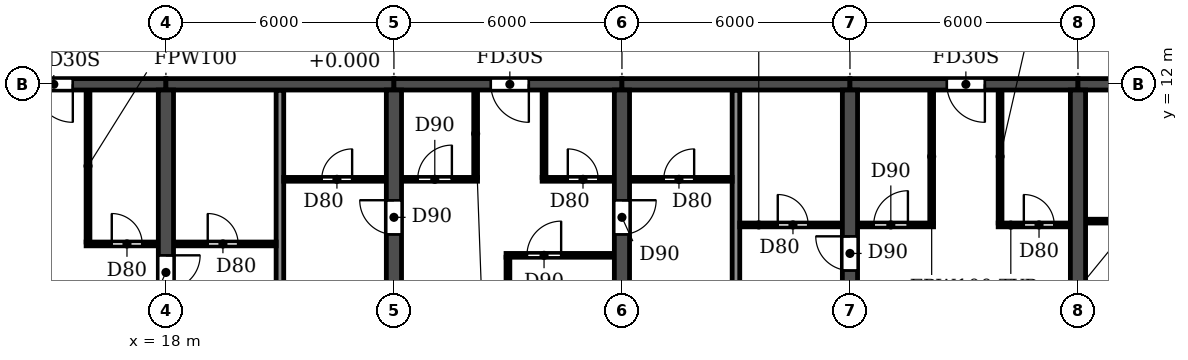
"""IFC4 building model, lengths in metres.
Left out: names, types, materials, properties, quantities, classifications, styles, units other than length and angle.
Written with IfcOpenShell. Run it as: python <this file> out.ifc"""

import sys

from ifc_helpers import new_model, si_unit, direction, frame, frame_2d, origin, place, context, subcontext, project, spatial, rectangle, extrude, element, fill, save


model = new_model("IFC4")
c1 = context("Model", 3, precision=1e-05, world=origin(), true_north=direction((0.0, 1.0)))
c2 = subcontext(c1, "Body", "Model", "MODEL_VIEW")
j1 = project(units=[si_unit("LENGTHUNIT", "METRE"), si_unit("PLANEANGLEUNIT", "RADIAN")], contexts=[c1])
p1 = place(None, origin())
s1 = spatial("IfcSite", under=j1, at=p1, CompositionType="ELEMENT")
p2 = place(p1, origin())
s2 = spatial("IfcBuilding", under=s1, at=p2, CompositionType="ELEMENT")
p3 = place(p2, frame((0.0, 0.0, 43.2)))
s3 = spatial("IfcBuildingStorey", under=s2, at=p3, CompositionType="ELEMENT", Elevation=43.2)
p4 = place(p3, frame((18.0, 0.2, 0.0), z_axis=(0.0, 0.0, 1.0), x_axis=(0.0, 1.0, 0.0)))
e1 = element("IfcWall", 1, at=p4, inside=s3, PredefinedType="SHEAR", context=c2, shape_type="SweptSolid", body=[
    extrude(rectangle(XDim=11.65, YDim=0.4, at=frame_2d((5.825, 0.0))), origin(), (0.0, 0.0, 1.0), 3.05),
])
p5 = place(p4, frame((6.4, 0.0, 0.0)))
e2 = element("IfcOpeningElement", 2, at=p5, cuts=e1, PredefinedType="OPENING", context=c2, shape_type="SweptSolid", body=[
    extrude(rectangle(XDim=0.9, YDim=2.1, at=frame_2d((0.45, 1.05))), frame((0.0, 0.21, 0.0), z_axis=(0.0, -1.0, 0.0), x_axis=(1.0, 0.0, 0.0)), (0.0, 0.0, 1.0), 0.42),
])
p6 = place(p3, frame((24.0, 0.2, 0.0), z_axis=(0.0, 0.0, 1.0), x_axis=(0.0, 1.0, 0.0)))
e3 = element("IfcWall", 3, at=p6, inside=s3, PredefinedType="SHEAR", context=c2, shape_type="SweptSolid", body=[
    extrude(rectangle(XDim=11.65, YDim=0.4, at=frame_2d((5.825, 0.0))), origin(), (0.0, 0.0, 1.0), 3.05),
])
p7 = place(p6, frame((7.85, 0.0, 0.0)))
e4 = element("IfcOpeningElement", 4, at=p7, cuts=e3, PredefinedType="OPENING", context=c2, shape_type="SweptSolid", body=[
    extrude(rectangle(XDim=0.9, YDim=2.1, at=frame_2d((0.45, 1.05))), frame((0.0, 0.21, 0.0), z_axis=(0.0, -1.0, 0.0), x_axis=(1.0, 0.0, 0.0)), (0.0, 0.0, 1.0), 0.42),
])
p8 = place(p3, frame((30.0, 0.2, 0.0), z_axis=(0.0, 0.0, 1.0), x_axis=(0.0, 1.0, 0.0)))
e5 = element("IfcWall", 5, at=p8, inside=s3, PredefinedType="SHEAR", context=c2, shape_type="SweptSolid", body=[
    extrude(rectangle(XDim=11.65, YDim=0.4, at=frame_2d((5.825, 0.0))), origin(), (0.0, 0.0, 1.0), 3.05),
])
p9 = place(p8, frame((7.85, 0.0, 0.0)))
e6 = element("IfcOpeningElement", 6, at=p9, cuts=e5, PredefinedType="OPENING", context=c2, shape_type="SweptSolid", body=[
    extrude(rectangle(XDim=0.9, YDim=2.1, at=frame_2d((0.45, 1.05))), frame((0.0, 0.21, 0.0), z_axis=(0.0, -1.0, 0.0), x_axis=(1.0, 0.0, 0.0)), (0.0, 0.0, 1.0), 0.42),
])
p10 = place(p3, frame((36.0, 0.2, 0.0), z_axis=(0.0, 0.0, 1.0), x_axis=(0.0, 1.0, 0.0)))
e7 = element("IfcWall", 7, at=p10, inside=s3, PredefinedType="SHEAR", context=c2, shape_type="SweptSolid", body=[
    extrude(rectangle(XDim=11.65, YDim=0.4, at=frame_2d((5.825, 0.0))), origin(), (0.0, 0.0, 1.0), 3.05),
])
p11 = place(p10, frame((6.9, 0.0, 0.0)))
e8 = element("IfcOpeningElement", 8, at=p11, cuts=e7, PredefinedType="OPENING", context=c2, shape_type="SweptSolid", body=[
    extrude(rectangle(XDim=0.9, YDim=2.1, at=frame_2d((0.45, 1.05))), frame((0.0, 0.21, 0.0), z_axis=(0.0, -1.0, 0.0), x_axis=(1.0, 0.0, 0.0)), (0.0, 0.0, 1.0), 0.42),
])
p12 = place(p3, frame((42.0, 0.2, 0.0), z_axis=(0.0, 0.0, 1.0), x_axis=(0.0, 1.0, 0.0)))
e9 = element("IfcWall", 9, at=p12, inside=s3, PredefinedType="SHEAR", context=c2, shape_type="SweptSolid", body=[
    extrude(rectangle(XDim=11.65, YDim=0.4, at=frame_2d((5.825, 0.0))), origin(), (0.0, 0.0, 1.0), 3.05),
])
p13 = place(p3, frame((12.0, 12.0, 0.0), z_axis=(0.0, 0.0, 1.0), x_axis=(1.0, 0.0, 0.0)))
e10 = element("IfcWall", 10, at=p13, inside=s3, PredefinedType="SHEAR", context=c2, shape_type="SweptSolid", body=[
    extrude(rectangle(XDim=6.0, YDim=0.3, at=frame_2d((3.0, 0.0))), origin(), (0.0, 0.0, 1.0), 2.45),
])
p14 = place(p13, frame((2.55, 0.0, 0.0)))
e11 = element("IfcOpeningElement", 11, at=p14, cuts=e10, PredefinedType="OPENING", context=c2, shape_type="SweptSolid", body=[
    extrude(rectangle(XDim=1.0, YDim=2.1, at=frame_2d((0.5, 1.05))), frame((0.0, 0.16, 0.0), z_axis=(0.0, -1.0, 0.0), x_axis=(1.0, 0.0, 0.0)), (0.0, 0.0, 1.0), 0.32),
])
p15 = place(p3, frame((18.0, 12.0, 0.0), z_axis=(0.0, 0.0, 1.0), x_axis=(1.0, 0.0, 0.0)))
e12 = element("IfcWall", 12, at=p15, inside=s3, PredefinedType="SHEAR", context=c2, shape_type="SweptSolid", body=[
    extrude(rectangle(XDim=6.0, YDim=0.3, at=frame_2d((3.0, 0.0))), origin(), (0.0, 0.0, 1.0), 2.45),
])
p16 = place(p3, frame((24.0, 12.0, 0.0), z_axis=(0.0, 0.0, 1.0), x_axis=(1.0, 0.0, 0.0)))
e13 = element("IfcWall", 13, at=p16, inside=s3, PredefinedType="SHEAR", context=c2, shape_type="SweptSolid", body=[
    extrude(rectangle(XDim=6.0, YDim=0.3, at=frame_2d((3.0, 0.0))), origin(), (0.0, 0.0, 1.0), 2.45),
])
p17 = place(p16, frame((2.55, 0.0, 0.0)))
e14 = element("IfcOpeningElement", 14, at=p17, cuts=e13, PredefinedType="OPENING", context=c2, shape_type="SweptSolid", body=[
    extrude(rectangle(XDim=1.0, YDim=2.1, at=frame_2d((0.5, 1.05))), frame((0.0, 0.16, 0.0), z_axis=(0.0, -1.0, 0.0), x_axis=(1.0, 0.0, 0.0)), (0.0, 0.0, 1.0), 0.32),
])
p18 = place(p3, frame((30.0, 12.0, 0.0), z_axis=(0.0, 0.0, 1.0), x_axis=(1.0, 0.0, 0.0)))
e15 = element("IfcWall", 15, at=p18, inside=s3, PredefinedType="SHEAR", context=c2, shape_type="SweptSolid", body=[
    extrude(rectangle(XDim=6.0, YDim=0.3, at=frame_2d((3.0, 0.0))), origin(), (0.0, 0.0, 1.0), 2.45),
])
p19 = place(p3, frame((36.0, 12.0, 0.0), z_axis=(0.0, 0.0, 1.0), x_axis=(1.0, 0.0, 0.0)))
e16 = element("IfcWall", 16, at=p19, inside=s3, PredefinedType="SHEAR", context=c2, shape_type="SweptSolid", body=[
    extrude(rectangle(XDim=6.0, YDim=0.3, at=frame_2d((3.0, 0.0))), origin(), (0.0, 0.0, 1.0), 2.45),
])
p20 = place(p19, frame((2.55, 0.0, 0.0)))
e17 = element("IfcOpeningElement", 17, at=p20, cuts=e16, PredefinedType="OPENING", context=c2, shape_type="SweptSolid", body=[
    extrude(rectangle(XDim=1.0, YDim=2.1, at=frame_2d((0.5, 1.05))), frame((0.0, 0.16, 0.0), z_axis=(0.0, -1.0, 0.0), x_axis=(1.0, 0.0, 0.0)), (0.0, 0.0, 1.0), 0.32),
])
p21 = place(p3, frame((42.0, 12.0, 0.0), z_axis=(0.0, 0.0, 1.0), x_axis=(1.0, 0.0, 0.0)))
e18 = element("IfcWall", 18, at=p21, inside=s3, PredefinedType="SHEAR", context=c2, shape_type="SweptSolid", body=[
    extrude(rectangle(XDim=6.0, YDim=0.3, at=frame_2d((3.0, 0.0))), origin(), (0.0, 0.0, 1.0), 2.45),
])
p22 = place(p21, frame((2.45, 0.0, 0.0)))
e19 = element("IfcOpeningElement", 19, at=p22, cuts=e18, PredefinedType="OPENING", context=c2, shape_type="SweptSolid", body=[
    extrude(rectangle(XDim=1.0, YDim=2.1, at=frame_2d((0.5, 1.05))), frame((0.0, 0.16, 0.0), z_axis=(0.0, -1.0, 0.0), x_axis=(1.0, 0.0, 0.0)), (0.0, 0.0, 1.0), 0.32),
])
for number, where, z_axis, x_axis in (
    (20, (21.0, 0.06, 0.0), (0.0, 0.0, 1.0), (0.0, 1.0, 0.0)),
    (21, (33.0, 0.06, 0.0), (0.0, 0.0, 1.0), (0.0, 1.0, 0.0)),
):
    element("IfcWall", number, at=place(p3, frame(where, z_axis=z_axis, x_axis=x_axis)), inside=s3, PredefinedType="PARTITIONING", context=c2, shape_type="SweptSolid", body=[
        extrude(rectangle(XDim=11.78, YDim=0.2, at=frame_2d((5.89, 0.0))), origin(), (0.0, 0.0, 1.0), 3.05),
    ])
p23 = place(p3, frame((26.95, 7.5, 0.0), z_axis=(0.0, 0.0, 1.0), x_axis=(1.0, 0.0, 0.0)))
e22 = element("IfcWall", 22, at=p23, inside=s3, PredefinedType="PARTITIONING", context=c2, shape_type="SweptSolid", body=[
    extrude(rectangle(XDim=2.84, YDim=0.1, at=frame_2d((1.42, 0.0))), origin(), (0.0, 0.0, 1.0), 3.05),
])
p24 = place(p23, frame((0.55, 0.0, 0.0)))
e23 = element("IfcOpeningElement", 23, at=p24, cuts=e22, PredefinedType="OPENING", context=c2, shape_type="SweptSolid", body=[
    extrude(rectangle(XDim=0.9, YDim=2.1, at=frame_2d((0.45, 1.05))), frame((0.0, 0.06, 0.0), z_axis=(0.0, -1.0, 0.0), x_axis=(1.0, 0.0, 0.0)), (0.0, 0.0, 1.0), 0.12),
])
p25 = place(p3, frame((15.9, 7.8, 0.0), z_axis=(0.0, 0.0, 1.0), x_axis=(1.0, 0.0, 0.0)))
e24 = element("IfcWall", 24, at=p25, inside=s3, PredefinedType="PARTITIONING", context=c2, shape_type="SweptSolid", body=[
    extrude(rectangle(XDim=1.89, YDim=0.1, at=frame_2d((0.945, 0.0))), origin(), (0.0, 0.0, 1.0), 3.05),
])
p26 = place(p25, frame((0.675, 0.0, 0.0)))
e25 = element("IfcOpeningElement", 25, at=p26, cuts=e24, PredefinedType="OPENING", context=c2, shape_type="SweptSolid", body=[
    extrude(rectangle(XDim=0.8, YDim=2.1, at=frame_2d((0.4, 1.05))), frame((0.0, 0.06, 0.0), z_axis=(0.0, -1.0, 0.0), x_axis=(1.0, 0.0, 0.0)), (0.0, 0.0, 1.0), 0.12),
])
p27 = place(p3, frame((18.21, 7.8, 0.0), z_axis=(0.0, 0.0, 1.0), x_axis=(1.0, 0.0, 0.0)))
e26 = element("IfcWall", 26, at=p27, inside=s3, PredefinedType="PARTITIONING", context=c2, shape_type="SweptSolid", body=[
    extrude(rectangle(XDim=2.69, YDim=0.1, at=frame_2d((1.345, 0.0))), origin(), (0.0, 0.0, 1.0), 3.05),
])
p28 = place(p27, frame((0.89, 0.0, 0.0)))
e27 = element("IfcOpeningElement", 27, at=p28, cuts=e26, PredefinedType="OPENING", context=c2, shape_type="SweptSolid", body=[
    extrude(rectangle(XDim=0.8, YDim=2.1, at=frame_2d((0.4, 1.05))), frame((0.0, 0.06, 0.0), z_axis=(0.0, -1.0, 0.0), x_axis=(1.0, 0.0, 0.0)), (0.0, 0.0, 1.0), 0.12),
])
p29 = place(p3, frame((33.1, 8.3, 0.0), z_axis=(0.0, 0.0, 1.0), x_axis=(1.0, 0.0, 0.0)))
e28 = element("IfcWall", 28, at=p29, inside=s3, PredefinedType="PARTITIONING", context=c2, shape_type="SweptSolid", body=[
    extrude(rectangle(XDim=2.69, YDim=0.1, at=frame_2d((1.345, 0.0))), origin(), (0.0, 0.0, 1.0), 3.05),
])
p30 = place(p29, frame((1.0, 0.0, 0.0)))
e29 = element("IfcOpeningElement", 29, at=p30, cuts=e28, PredefinedType="OPENING", context=c2, shape_type="SweptSolid", body=[
    extrude(rectangle(XDim=0.8, YDim=2.1, at=frame_2d((0.4, 1.05))), frame((0.0, 0.06, 0.0), z_axis=(0.0, -1.0, 0.0), x_axis=(1.0, 0.0, 0.0)), (0.0, 0.0, 1.0), 0.12),
])
p31 = place(p3, frame((36.21, 8.3, 0.0), z_axis=(0.0, 0.0, 1.0), x_axis=(1.0, 0.0, 0.0)))
e30 = element("IfcWall", 30, at=p31, inside=s3, PredefinedType="PARTITIONING", context=c2, shape_type="SweptSolid", body=[
    extrude(rectangle(XDim=1.99, YDim=0.1, at=frame_2d((0.995, 0.0))), origin(), (0.0, 0.0, 1.0), 3.05),
])
p32 = place(p31, frame((0.415, 0.0, 0.0)))
e31 = element("IfcOpeningElement", 31, at=p32, cuts=e30, PredefinedType="OPENING", context=c2, shape_type="SweptSolid", body=[
    extrude(rectangle(XDim=0.9, YDim=2.1, at=frame_2d((0.45, 1.05))), frame((0.0, 0.06, 0.0), z_axis=(0.0, -1.0, 0.0), x_axis=(1.0, 0.0, 0.0)), (0.0, 0.0, 1.0), 0.12),
])
p33 = place(p3, frame((39.9, 8.3, 0.0), z_axis=(0.0, 0.0, 1.0), x_axis=(1.0, 0.0, 0.0)))
e32 = element("IfcWall", 32, at=p33, inside=s3, PredefinedType="PARTITIONING", context=c2, shape_type="SweptSolid", body=[
    extrude(rectangle(XDim=1.89, YDim=0.1, at=frame_2d((0.945, 0.0))), origin(), (0.0, 0.0, 1.0), 3.05),
])
p34 = place(p33, frame((0.675, 0.0, 0.0)))
e33 = element("IfcOpeningElement", 33, at=p34, cuts=e32, PredefinedType="OPENING", context=c2, shape_type="SweptSolid", body=[
    extrude(rectangle(XDim=0.8, YDim=2.1, at=frame_2d((0.4, 1.05))), frame((0.0, 0.06, 0.0), z_axis=(0.0, -1.0, 0.0), x_axis=(1.0, 0.0, 0.0)), (0.0, 0.0, 1.0), 0.12),
])
p35 = place(p3, frame((42.21, 8.4, 0.0), z_axis=(0.0, 0.0, 1.0), x_axis=(1.0, 0.0, 0.0)))
e34 = element("IfcWall", 34, at=p35, inside=s3, PredefinedType="PARTITIONING", context=c2, shape_type="SweptSolid", body=[
    extrude(rectangle(XDim=1.89, YDim=0.1, at=frame_2d((0.945, 0.0))), origin(), (0.0, 0.0, 1.0), 3.05),
])
p36 = place(p3, frame((21.1, 9.5, 0.0), z_axis=(0.0, 0.0, 1.0), x_axis=(1.0, 0.0, 0.0)))
e35 = element("IfcWall", 35, at=p36, inside=s3, PredefinedType="PARTITIONING", context=c2, shape_type="SweptSolid", body=[
    extrude(rectangle(XDim=2.69, YDim=0.1, at=frame_2d((1.345, 0.0))), origin(), (0.0, 0.0, 1.0), 3.05),
])
p37 = place(p36, frame((1.0, 0.0, 0.0)))
e36 = element("IfcOpeningElement", 36, at=p37, cuts=e35, PredefinedType="OPENING", context=c2, shape_type="SweptSolid", body=[
    extrude(rectangle(XDim=0.8, YDim=2.1, at=frame_2d((0.4, 1.05))), frame((0.0, 0.06, 0.0), z_axis=(0.0, -1.0, 0.0), x_axis=(1.0, 0.0, 0.0)), (0.0, 0.0, 1.0), 0.12),
])
p38 = place(p3, frame((24.21, 9.5, 0.0), z_axis=(0.0, 0.0, 1.0), x_axis=(1.0, 0.0, 0.0)))
e37 = element("IfcWall", 37, at=p38, inside=s3, PredefinedType="PARTITIONING", context=c2, shape_type="SweptSolid", body=[
    extrude(rectangle(XDim=1.99, YDim=0.1, at=frame_2d((0.995, 0.0))), origin(), (0.0, 0.0, 1.0), 3.05),
])
p39 = place(p38, frame((0.415, 0.0, 0.0)))
e38 = element("IfcOpeningElement", 38, at=p39, cuts=e37, PredefinedType="OPENING", context=c2, shape_type="SweptSolid", body=[
    extrude(rectangle(XDim=0.9, YDim=2.1, at=frame_2d((0.45, 1.05))), frame((0.0, 0.06, 0.0), z_axis=(0.0, -1.0, 0.0), x_axis=(1.0, 0.0, 0.0)), (0.0, 0.0, 1.0), 0.12),
])
p40 = place(p3, frame((27.9, 9.5, 0.0), z_axis=(0.0, 0.0, 1.0), x_axis=(1.0, 0.0, 0.0)))
e39 = element("IfcWall", 39, at=p40, inside=s3, PredefinedType="PARTITIONING", context=c2, shape_type="SweptSolid", body=[
    extrude(rectangle(XDim=1.89, YDim=0.1, at=frame_2d((0.945, 0.0))), origin(), (0.0, 0.0, 1.0), 3.05),
])
p41 = place(p40, frame((0.675, 0.0, 0.0)))
e40 = element("IfcOpeningElement", 40, at=p41, cuts=e39, PredefinedType="OPENING", context=c2, shape_type="SweptSolid", body=[
    extrude(rectangle(XDim=0.8, YDim=2.1, at=frame_2d((0.4, 1.05))), frame((0.0, 0.06, 0.0), z_axis=(0.0, -1.0, 0.0), x_axis=(1.0, 0.0, 0.0)), (0.0, 0.0, 1.0), 0.12),
])
p42 = place(p3, frame((30.21, 9.5, 0.0), z_axis=(0.0, 0.0, 1.0), x_axis=(1.0, 0.0, 0.0)))
e41 = element("IfcWall", 41, at=p42, inside=s3, PredefinedType="PARTITIONING", context=c2, shape_type="SweptSolid", body=[
    extrude(rectangle(XDim=2.69, YDim=0.1, at=frame_2d((1.345, 0.0))), origin(), (0.0, 0.0, 1.0), 3.05),
])
p43 = place(p42, frame((0.89, 0.0, 0.0)))
e42 = element("IfcOpeningElement", 42, at=p43, cuts=e41, PredefinedType="OPENING", context=c2, shape_type="SweptSolid", body=[
    extrude(rectangle(XDim=0.8, YDim=2.1, at=frame_2d((0.4, 1.05))), frame((0.0, 0.06, 0.0), z_axis=(0.0, -1.0, 0.0), x_axis=(1.0, 0.0, 0.0)), (0.0, 0.0, 1.0), 0.12),
])
p44 = place(p3, frame((15.95, 7.85, 0.0), z_axis=(0.0, 0.0, 1.0), x_axis=(0.0, 1.0, 0.0)))
e43 = element("IfcWall", 43, at=p44, inside=s3, PredefinedType="PARTITIONING", context=c2, shape_type="SweptSolid", body=[
    extrude(rectangle(XDim=3.99, YDim=0.1, at=frame_2d((1.995, 0.0))), origin(), (0.0, 0.0, 1.0), 3.05),
])
p45 = place(p3, frame((26.15, 9.55, 0.0), z_axis=(0.0, 0.0, 1.0), x_axis=(0.0, 1.0, 0.0)))
e44 = element("IfcWall", 44, at=p45, inside=s3, PredefinedType="PARTITIONING", context=c2, shape_type="SweptSolid", body=[
    extrude(rectangle(XDim=2.29, YDim=0.1, at=frame_2d((1.145, 0.0))), origin(), (0.0, 0.0, 1.0), 3.05),
])
p46 = place(p3, frame((27.0, 0.06, 0.0), z_axis=(0.0, 0.0, 1.0), x_axis=(0.0, 1.0, 0.0)))
e45 = element("IfcWall", 45, at=p46, inside=s3, PredefinedType="PARTITIONING", context=c2, shape_type="SweptSolid", body=[
    extrude(rectangle(XDim=7.39, YDim=0.1, at=frame_2d((3.695, 0.0))), origin(), (0.0, 0.0, 1.0), 3.05),
])
p47 = place(p3, frame((27.95, 9.55, 0.0), z_axis=(0.0, 0.0, 1.0), x_axis=(0.0, 1.0, 0.0)))
e46 = element("IfcWall", 46, at=p47, inside=s3, PredefinedType="PARTITIONING", context=c2, shape_type="SweptSolid", body=[
    extrude(rectangle(XDim=2.29, YDim=0.1, at=frame_2d((1.145, 0.0))), origin(), (0.0, 0.0, 1.0), 3.05),
])
for number, where, z_axis, x_axis in (
    (47, (38.15, 8.35, 0.0), (0.0, 0.0, 1.0), (0.0, 1.0, 0.0)),
    (48, (39.95, 8.35, 0.0), (0.0, 0.0, 1.0), (0.0, 1.0, 0.0)),
):
    element("IfcWall", number, at=place(p3, frame(where, z_axis=z_axis, x_axis=x_axis)), inside=s3, PredefinedType="PARTITIONING", context=c2, shape_type="SweptSolid", body=[
        extrude(rectangle(XDim=3.49, YDim=0.1, at=frame_2d((1.745, 0.0))), origin(), (0.0, 0.0, 1.0), 3.05),
    ])
p48 = place(p28, origin())
e49 = element("IfcDoor", 49, at=p48, inside=s3, OperationType="SINGLE_SWING_LEFT", PredefinedType="DOOR", context=c2, shape_type="SweptSolid", body=[
    extrude(rectangle(XDim=0.8, YDim=2.1, at=frame_2d((0.4, 1.05))), frame((0.0, 0.025, 0.0), z_axis=(0.0, -1.0, 0.0), x_axis=(1.0, 0.0, 0.0)), (0.0, 0.0, 1.0), 0.05),
])
fill(e27, e49)
p49 = place(p14, frame((1.0, 0.0, 0.0), z_axis=(0.0, 0.0, 1.0), x_axis=(-1.0, 0.0, 0.0)))
e50 = element("IfcDoor", 50, at=p49, inside=s3, OperationType="SINGLE_SWING_LEFT", PredefinedType="DOOR", context=c2, shape_type="SweptSolid", body=[
    extrude(rectangle(XDim=1.0, YDim=2.1, at=frame_2d((0.5, 1.05))), frame((0.0, 0.025, 0.0), z_axis=(0.0, -1.0, 0.0), x_axis=(1.0, 0.0, 0.0)), (0.0, 0.0, 1.0), 0.05),
])
fill(e11, e50)
p50 = place(p26, origin())
e51 = element("IfcDoor", 51, at=p50, inside=s3, OperationType="SINGLE_SWING_LEFT", PredefinedType="DOOR", context=c2, shape_type="SweptSolid", body=[
    extrude(rectangle(XDim=0.8, YDim=2.1, at=frame_2d((0.4, 1.05))), frame((0.0, 0.025, 0.0), z_axis=(0.0, -1.0, 0.0), x_axis=(1.0, 0.0, 0.0)), (0.0, 0.0, 1.0), 0.05),
])
fill(e25, e51)
p51 = place(p5, frame((0.9, 0.0, 0.0), z_axis=(0.0, 0.0, 1.0), x_axis=(-1.0, 0.0, 0.0)))
e52 = element("IfcDoor", 52, at=p51, inside=s3, OperationType="SINGLE_SWING_LEFT", PredefinedType="DOOR", context=c2, shape_type="SweptSolid", body=[
    extrude(rectangle(XDim=0.9, YDim=2.1, at=frame_2d((0.45, 1.05))), frame((0.0, 0.025, 0.0), z_axis=(0.0, -1.0, 0.0), x_axis=(1.0, 0.0, 0.0)), (0.0, 0.0, 1.0), 0.05),
])
fill(e2, e52)
p52 = place(p37, origin())
e53 = element("IfcDoor", 53, at=p52, inside=s3, OperationType="SINGLE_SWING_RIGHT", PredefinedType="DOOR", context=c2, shape_type="SweptSolid", body=[
    extrude(rectangle(XDim=0.8, YDim=2.1, at=frame_2d((0.4, 1.05))), frame((0.0, 0.025, 0.0), z_axis=(0.0, -1.0, 0.0), x_axis=(1.0, 0.0, 0.0)), (0.0, 0.0, 1.0), 0.05),
])
fill(e36, e53)
p53 = place(p43, origin())
e54 = element("IfcDoor", 54, at=p53, inside=s3, OperationType="SINGLE_SWING_RIGHT", PredefinedType="DOOR", context=c2, shape_type="SweptSolid", body=[
    extrude(rectangle(XDim=0.8, YDim=2.1, at=frame_2d((0.4, 1.05))), frame((0.0, 0.025, 0.0), z_axis=(0.0, -1.0, 0.0), x_axis=(1.0, 0.0, 0.0)), (0.0, 0.0, 1.0), 0.05),
])
fill(e42, e54)
p54 = place(p7, origin())
e55 = element("IfcDoor", 55, at=p54, inside=s3, OperationType="SINGLE_SWING_RIGHT", PredefinedType="DOOR", context=c2, shape_type="SweptSolid", body=[
    extrude(rectangle(XDim=0.9, YDim=2.1, at=frame_2d((0.45, 1.05))), frame((0.0, 0.025, 0.0), z_axis=(0.0, -1.0, 0.0), x_axis=(1.0, 0.0, 0.0)), (0.0, 0.0, 1.0), 0.05),
])
fill(e4, e55)
p55 = place(p39, origin())
e56 = element("IfcDoor", 56, at=p55, inside=s3, OperationType="SINGLE_SWING_RIGHT", PredefinedType="DOOR", context=c2, shape_type="SweptSolid", body=[
    extrude(rectangle(XDim=0.9, YDim=2.1, at=frame_2d((0.45, 1.05))), frame((0.0, 0.025, 0.0), z_axis=(0.0, -1.0, 0.0), x_axis=(1.0, 0.0, 0.0)), (0.0, 0.0, 1.0), 0.05),
])
fill(e38, e56)
p56 = place(p17, frame((1.0, 0.0, 0.0), z_axis=(0.0, 0.0, 1.0), x_axis=(-1.0, 0.0, 0.0)))
e57 = element("IfcDoor", 57, at=p56, inside=s3, OperationType="SINGLE_SWING_LEFT", PredefinedType="DOOR", context=c2, shape_type="SweptSolid", body=[
    extrude(rectangle(XDim=1.0, YDim=2.1, at=frame_2d((0.5, 1.05))), frame((0.0, 0.025, 0.0), z_axis=(0.0, -1.0, 0.0), x_axis=(1.0, 0.0, 0.0)), (0.0, 0.0, 1.0), 0.05),
])
fill(e14, e57)
p57 = place(p24, origin())
e58 = element("IfcDoor", 58, at=p57, inside=s3, OperationType="SINGLE_SWING_RIGHT", PredefinedType="DOOR", context=c2, shape_type="SweptSolid", body=[
    extrude(rectangle(XDim=0.9, YDim=2.1, at=frame_2d((0.45, 1.05))), frame((0.0, 0.025, 0.0), z_axis=(0.0, -1.0, 0.0), x_axis=(1.0, 0.0, 0.0)), (0.0, 0.0, 1.0), 0.05),
])
fill(e23, e58)
p58 = place(p41, origin())
e59 = element("IfcDoor", 59, at=p58, inside=s3, OperationType="SINGLE_SWING_LEFT", PredefinedType="DOOR", context=c2, shape_type="SweptSolid", body=[
    extrude(rectangle(XDim=0.8, YDim=2.1, at=frame_2d((0.4, 1.05))), frame((0.0, 0.025, 0.0), z_axis=(0.0, -1.0, 0.0), x_axis=(1.0, 0.0, 0.0)), (0.0, 0.0, 1.0), 0.05),
])
fill(e40, e59)
p59 = place(p9, frame((0.9, 0.0, 0.0), z_axis=(0.0, 0.0, 1.0), x_axis=(-1.0, 0.0, 0.0)))
e60 = element("IfcDoor", 60, at=p59, inside=s3, OperationType="SINGLE_SWING_LEFT", PredefinedType="DOOR", context=c2, shape_type="SweptSolid", body=[
    extrude(rectangle(XDim=0.9, YDim=2.1, at=frame_2d((0.45, 1.05))), frame((0.0, 0.025, 0.0), z_axis=(0.0, -1.0, 0.0), x_axis=(1.0, 0.0, 0.0)), (0.0, 0.0, 1.0), 0.05),
])
fill(e6, e60)
p60 = place(p30, origin())
e61 = element("IfcDoor", 61, at=p60, inside=s3, OperationType="SINGLE_SWING_LEFT", PredefinedType="DOOR", context=c2, shape_type="SweptSolid", body=[
    extrude(rectangle(XDim=0.8, YDim=2.1, at=frame_2d((0.4, 1.05))), frame((0.0, 0.025, 0.0), z_axis=(0.0, -1.0, 0.0), x_axis=(1.0, 0.0, 0.0)), (0.0, 0.0, 1.0), 0.05),
])
fill(e29, e61)
p61 = place(p11, origin())
e62 = element("IfcDoor", 62, at=p61, inside=s3, OperationType="SINGLE_SWING_RIGHT", PredefinedType="DOOR", context=c2, shape_type="SweptSolid", body=[
    extrude(rectangle(XDim=0.9, YDim=2.1, at=frame_2d((0.45, 1.05))), frame((0.0, 0.025, 0.0), z_axis=(0.0, -1.0, 0.0), x_axis=(1.0, 0.0, 0.0)), (0.0, 0.0, 1.0), 0.05),
])
fill(e8, e62)
p62 = place(p32, origin())
e63 = element("IfcDoor", 63, at=p62, inside=s3, OperationType="SINGLE_SWING_RIGHT", PredefinedType="DOOR", context=c2, shape_type="SweptSolid", body=[
    extrude(rectangle(XDim=0.9, YDim=2.1, at=frame_2d((0.45, 1.05))), frame((0.0, 0.025, 0.0), z_axis=(0.0, -1.0, 0.0), x_axis=(1.0, 0.0, 0.0)), (0.0, 0.0, 1.0), 0.05),
])
fill(e31, e63)
p63 = place(p20, frame((1.0, 0.0, 0.0), z_axis=(0.0, 0.0, 1.0), x_axis=(-1.0, 0.0, 0.0)))
e64 = element("IfcDoor", 64, at=p63, inside=s3, OperationType="SINGLE_SWING_LEFT", PredefinedType="DOOR", context=c2, shape_type="SweptSolid", body=[
    extrude(rectangle(XDim=1.0, YDim=2.1, at=frame_2d((0.5, 1.05))), frame((0.0, 0.025, 0.0), z_axis=(0.0, -1.0, 0.0), x_axis=(1.0, 0.0, 0.0)), (0.0, 0.0, 1.0), 0.05),
])
fill(e17, e64)
p64 = place(p34, origin())
e65 = element("IfcDoor", 65, at=p64, inside=s3, OperationType="SINGLE_SWING_LEFT", PredefinedType="DOOR", context=c2, shape_type="SweptSolid", body=[
    extrude(rectangle(XDim=0.8, YDim=2.1, at=frame_2d((0.4, 1.05))), frame((0.0, 0.025, 0.0), z_axis=(0.0, -1.0, 0.0), x_axis=(1.0, 0.0, 0.0)), (0.0, 0.0, 1.0), 0.05),
])
fill(e33, e65)
save(model, sys.argv[1])
